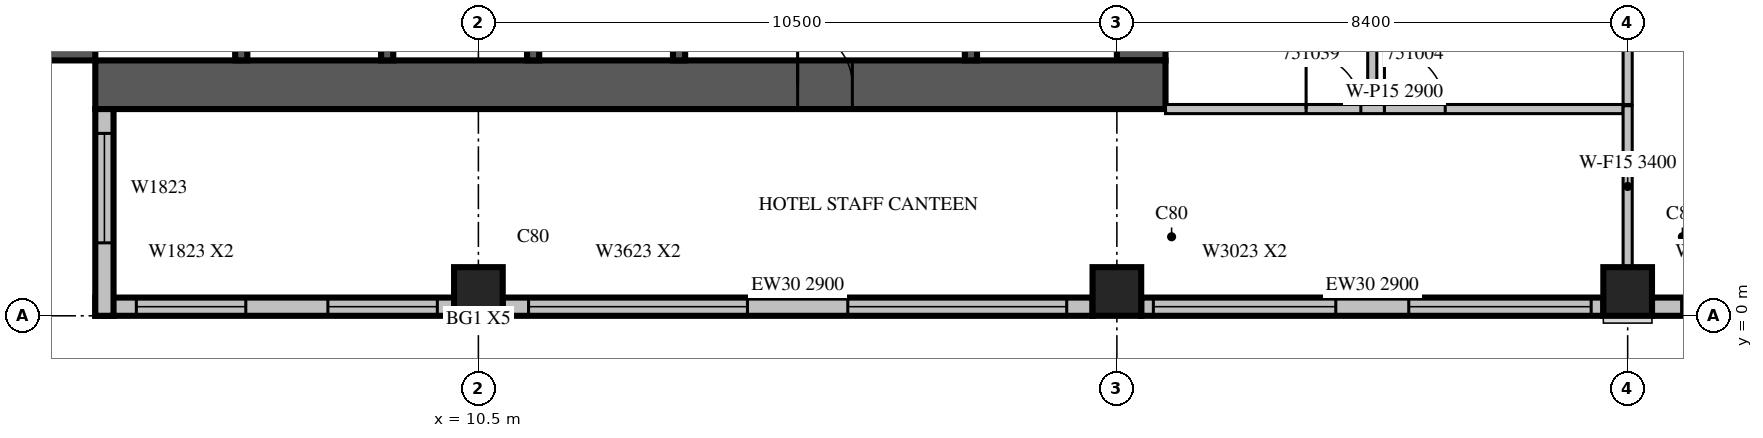
"""IFC4 building model, lengths in metres.
Left out: names, types, materials, properties, quantities, classifications, styles, units other than length and angle.
Written with IfcOpenShell. Run it as: python <this file> out.ifc"""

import sys

from ifc_helpers import new_model, si_unit, direction, frame, frame_2d, origin, origin_2d, place, context, subcontext, project, spatial, rectangle, extrude, source, transform, mapped, element, fill, save


model = new_model("IFC4")
c1 = context("Model", 3, precision=1e-05, world=origin(), true_north=direction((0.0, 1.0)))
c2 = subcontext(c1, "Body", "Model", "MODEL_VIEW")
j1 = project(units=[si_unit("LENGTHUNIT", "METRE"), si_unit("PLANEANGLEUNIT", "RADIAN")], contexts=[c1])
p1 = place(None, origin())
s1 = spatial("IfcSite", under=j1, at=p1, CompositionType="ELEMENT")
p2 = place(p1, origin())
s2 = spatial("IfcBuilding", under=s1, at=p2, CompositionType="ELEMENT")
p3 = place(p2, frame((0.0, 0.0, 227.2)))
s3 = spatial("IfcBuildingStorey", under=s2, at=p3, CompositionType="ELEMENT", Elevation=227.2)
p4 = place(p3, frame((10.5, 0.4, 0.0), z_axis=(0.0, 0.0, 1.0), x_axis=(1.0, 0.0, 0.0)))
e1 = element("IfcColumn", 1, at=p4, inside=s3, PredefinedType="COLUMN", context=c2, shape_type="SweptSolid", body=[
    extrude(rectangle(XDim=0.8, YDim=0.8, at=origin_2d()), origin(), (0.0, 0.0, 1.0), 3.8),
])
m1 = source(origin(), c2, "Body", "SweptSolid", [
    extrude(rectangle(XDim=0.8, YDim=0.8, at=origin_2d()), origin(), (0.0, 0.0, 1.0), 3.8),
])
for number, where, z_axis, x_axis in (
    (2, (21.0, 0.4, 0.0), (0.0, 0.0, 1.0), (1.0, 0.0, 0.0)),
    (3, (29.4, 0.4, 0.0), (0.0, 0.0, 1.0), (1.0, 0.0, 0.0)),
):
    element("IfcColumn", number, at=place(p3, frame(where, z_axis=z_axis, x_axis=x_axis)), inside=s3, PredefinedType="COLUMN", context=c2, shape_type="MappedRepresentation", body=[
        mapped(m1, transform((0.0, 0.0, 0.0), scale=1.0)),
    ])
m2 = source(origin(), c2, "Body", "SweptSolid", [
    extrude(rectangle(XDim=17.6, YDim=0.8, at=frame_2d((8.8, 0.0))), origin(), (0.0, 0.0, 1.0), 3.8),
])
p5 = place(p3, frame((3.8, 4.2, 0.0), z_axis=(0.0, 0.0, 1.0), x_axis=(0.0, 1.0, 0.0)))
e4 = element("IfcWall", 4, at=p5, inside=s3, PredefinedType="SHEAR", context=c2, shape_type="MappedRepresentation", body=[
    mapped(m2, transform((0.0, 0.0, 0.0), scale=1.0)),
])
m3 = source(origin(), c2, "Body", "SweptSolid", [
    extrude(rectangle(XDim=2.2, YDim=2.1, at=frame_2d((1.1, 1.05))), frame((0.0, 0.41, 0.0), z_axis=(0.0, -1.0, 0.0), x_axis=(1.0, 0.0, 0.0)), (0.0, 0.0, 1.0), 0.82),
])
p6 = place(p5, frame((4.2, 0.0, 0.0)))
e5 = element("IfcOpeningElement", 5, at=p6, cuts=e4, PredefinedType="OPENING", context=c2, shape_type="MappedRepresentation", body=[
    mapped(m3, transform((0.0, 0.0, 0.0), scale=1.0)),
])
m4 = source(origin(), c2, "Body", "SweptSolid", [
    extrude(rectangle(XDim=0.9, YDim=2.1, at=frame_2d((0.45, 1.05))), frame((0.0, 0.41, 0.0), z_axis=(0.0, -1.0, 0.0), x_axis=(1.0, 0.0, 0.0)), (0.0, 0.0, 1.0), 0.82),
])
p7 = place(p5, frame((10.95, 0.0, 0.0)))
e6 = element("IfcOpeningElement", 6, at=p7, cuts=e4, PredefinedType="OPENING", context=c2, shape_type="MappedRepresentation", body=[
    mapped(m4, transform((0.0, 0.0, 0.0), scale=1.0)),
])
m5 = source(origin(), c2, "Body", "SweptSolid", [
    extrude(rectangle(XDim=16.8, YDim=0.8, at=frame_2d((8.4, 0.0))), origin(), (0.0, 0.0, 1.0), 3.8),
])
p8 = place(p3, frame((21.4, 4.2, 0.0), z_axis=(0.0, 0.0, 1.0), x_axis=(0.0, 1.0, 0.0)))
e7 = element("IfcWall", 7, at=p8, inside=s3, PredefinedType="SHEAR", context=c2, shape_type="MappedRepresentation", body=[
    mapped(m5, transform((0.0, 0.0, 0.0), scale=1.0)),
])
p9 = place(p8, frame((4.2, 0.0, 0.0)))
e8 = element("IfcOpeningElement", 8, at=p9, cuts=e7, PredefinedType="OPENING", context=c2, shape_type="MappedRepresentation", body=[
    mapped(m3, transform((0.0, 0.0, 0.0), scale=1.0)),
])
m6 = source(origin(), c2, "Body", "SweptSolid", [
    extrude(rectangle(XDim=1.2, YDim=2.1, at=frame_2d((0.6, 1.05))), frame((0.0, 0.41, 0.0), z_axis=(0.0, -1.0, 0.0), x_axis=(1.0, 0.0, 0.0)), (0.0, 0.0, 1.0), 0.82),
])
p10 = place(p8, frame((14.7, 0.0, 0.0)))
e9 = element("IfcOpeningElement", 9, at=p10, cuts=e7, PredefinedType="OPENING", context=c2, shape_type="MappedRepresentation", body=[
    mapped(m6, transform((0.0, 0.0, 0.0), scale=1.0)),
])
p11 = place(p3, frame((4.2, 3.8, 0.0), z_axis=(0.0, 0.0, 1.0), x_axis=(1.0, 0.0, 0.0)))
e10 = element("IfcWall", 10, at=p11, inside=s3, PredefinedType="SHEAR", context=c2, shape_type="MappedRepresentation", body=[
    mapped(m2, transform((0.0, 0.0, 0.0), scale=1.0)),
])
p12 = place(p11, frame((11.55, 0.0, 0.0)))
e11 = element("IfcOpeningElement", 11, at=p12, cuts=e10, PredefinedType="OPENING", context=c2, shape_type="MappedRepresentation", body=[
    mapped(m4, transform((0.0, 0.0, 0.0), scale=1.0)),
])
p13 = place(p3, frame((4.2, 0.15, 0.0), z_axis=(0.0, 0.0, 1.0), x_axis=(1.0, 0.0, 0.0)))
e12 = element("IfcWall", 12, at=p13, inside=s3, PredefinedType="STANDARD", context=c2, shape_type="SweptSolid", body=[
    extrude(rectangle(XDim=5.9, YDim=0.3, at=frame_2d((2.95, 0.0))), origin(), (0.0, 0.0, 1.0), 3.4),
])
m7 = source(origin(), c2, "Body", "SweptSolid", [
    extrude(rectangle(XDim=1.8, YDim=2.3, at=frame_2d((0.9, 1.15))), frame((0.0, 0.16, 0.0), z_axis=(0.0, -1.0, 0.0), x_axis=(1.0, 0.0, 0.0)), (0.0, 0.0, 1.0), 0.32),
])
p14 = place(p13, frame((0.675, 0.0, 0.6)))
e13 = element("IfcOpeningElement", 13, at=p14, cuts=e12, PredefinedType="OPENING", context=c2, shape_type="MappedRepresentation", body=[
    mapped(m7, transform((0.0, 0.0, 0.0), scale=1.0)),
])
p15 = place(p13, frame((3.825, 0.0, 0.6)))
e14 = element("IfcOpeningElement", 14, at=p15, cuts=e12, PredefinedType="OPENING", context=c2, shape_type="MappedRepresentation", body=[
    mapped(m7, transform((0.0, 0.0, 0.0), scale=1.0)),
])
p16 = place(p3, frame((10.9, 0.15, 0.0), z_axis=(0.0, 0.0, 1.0), x_axis=(1.0, 0.0, 0.0)))
e15 = element("IfcWall", 15, at=p16, inside=s3, PredefinedType="STANDARD", context=c2, shape_type="SweptSolid", body=[
    extrude(rectangle(XDim=9.7, YDim=0.3, at=frame_2d((4.85, 0.0))), origin(), (0.0, 0.0, 1.0), 2.9),
])
m8 = source(origin(), c2, "Body", "SweptSolid", [
    extrude(rectangle(XDim=3.6, YDim=2.3, at=frame_2d((1.8, 1.15))), frame((0.0, 0.16, 0.0), z_axis=(0.0, -1.0, 0.0), x_axis=(1.0, 0.0, 0.0)), (0.0, 0.0, 1.0), 0.32),
])
p17 = place(p16, frame((0.425, 0.0, 0.6)))
e16 = element("IfcOpeningElement", 16, at=p17, cuts=e15, PredefinedType="OPENING", context=c2, shape_type="MappedRepresentation", body=[
    mapped(m8, transform((0.0, 0.0, 0.0), scale=1.0)),
])
p18 = place(p16, frame((5.675, 0.0, 0.6)))
e17 = element("IfcOpeningElement", 17, at=p18, cuts=e15, PredefinedType="OPENING", context=c2, shape_type="MappedRepresentation", body=[
    mapped(m8, transform((0.0, 0.0, 0.0), scale=1.0)),
])
p19 = place(p3, frame((21.4, 0.15, 0.0), z_axis=(0.0, 0.0, 1.0), x_axis=(1.0, 0.0, 0.0)))
e18 = element("IfcWall", 18, at=p19, inside=s3, PredefinedType="STANDARD", context=c2, shape_type="SweptSolid", body=[
    extrude(rectangle(XDim=7.6, YDim=0.3, at=frame_2d((3.8, 0.0))), origin(), (0.0, 0.0, 1.0), 2.9),
])
m9 = source(origin(), c2, "Body", "SweptSolid", [
    extrude(rectangle(XDim=3.0, YDim=2.3, at=frame_2d((1.5, 1.15))), frame((0.0, 0.16, 0.0), z_axis=(0.0, -1.0, 0.0), x_axis=(1.0, 0.0, 0.0)), (0.0, 0.0, 1.0), 0.32),
])
p20 = place(p19, frame((0.2, 0.0, 0.6)))
e19 = element("IfcOpeningElement", 19, at=p20, cuts=e18, PredefinedType="OPENING", context=c2, shape_type="MappedRepresentation", body=[
    mapped(m9, transform((0.0, 0.0, 0.0), scale=1.0)),
])
p21 = place(p19, frame((4.4, 0.0, 0.6)))
e20 = element("IfcOpeningElement", 20, at=p21, cuts=e18, PredefinedType="OPENING", context=c2, shape_type="MappedRepresentation", body=[
    mapped(m9, transform((0.0, 0.0, 0.0), scale=1.0)),
])
p22 = place(p3, frame((29.8, 0.15, 0.0), z_axis=(0.0, 0.0, 1.0), x_axis=(1.0, 0.0, 0.0)))
e21 = element("IfcWall", 21, at=p22, inside=s3, PredefinedType="STANDARD", context=c2, shape_type="SweptSolid", body=[
    extrude(rectangle(XDim=7.6, YDim=0.3, at=frame_2d((3.8, 0.0))), origin(), (0.0, 0.0, 1.0), 3.4),
])
m10 = source(origin(), c2, "Body", "SweptSolid", [
    extrude(rectangle(XDim=1.2, YDim=2.3, at=frame_2d((0.6, 1.15))), frame((0.0, 0.16, 0.0), z_axis=(0.0, -1.0, 0.0), x_axis=(1.0, 0.0, 0.0)), (0.0, 0.0, 1.0), 0.32),
])
p23 = place(p22, frame((0.487, 0.0, 0.6)))
e22 = element("IfcOpeningElement", 22, at=p23, cuts=e21, PredefinedType="OPENING", context=c2, shape_type="MappedRepresentation", body=[
    mapped(m10, transform((0.0, 0.0, 0.0), scale=1.0)),
])
p24 = place(p22, frame((6.013, 0.0, 0.6)))
e23 = element("IfcOpeningElement", 23, at=p24, cuts=e21, PredefinedType="OPENING", context=c2, shape_type="MappedRepresentation", body=[
    mapped(m10, transform((0.0, 0.0, 0.0), scale=1.0)),
])
m11 = source(origin(), c2, "Body", "SweptSolid", [
    extrude(rectangle(XDim=3.4, YDim=0.3, at=frame_2d((1.7, 0.0))), origin(), (0.0, 0.0, 1.0), 3.4),
])
p25 = place(p3, frame((4.35, 3.4, 0.0), z_axis=(0.0, 0.0, 1.0), x_axis=(0.0, -1.0, 0.0)))
e24 = element("IfcWall", 24, at=p25, inside=s3, PredefinedType="STANDARD", context=c2, shape_type="MappedRepresentation", body=[
    mapped(m11, transform((0.0, 0.0, 0.0), scale=1.0)),
])
p26 = place(p25, frame((0.4, 0.0, 0.6)))
e25 = element("IfcOpeningElement", 25, at=p26, cuts=e24, PredefinedType="OPENING", context=c2, shape_type="MappedRepresentation", body=[
    mapped(m7, transform((0.0, 0.0, 0.0), scale=1.0)),
])
m12 = source(origin(), c2, "Body", "SweptSolid", [
    extrude(rectangle(XDim=3.1, YDim=0.2, at=frame_2d((1.55, 0.0))), origin(), (0.0, 0.0, 1.0), 3.8),
])
for number, where, z_axis, x_axis in (
    (26, (6.6, 4.2, 0.0), (0.0, 0.0, 1.0), (0.0, 1.0, 0.0)),
    (27, (9.0, 4.2, 0.0), (0.0, 0.0, 1.0), (0.0, 1.0, 0.0)),
    (28, (11.4, 4.2, 0.0), (0.0, 0.0, 1.0), (0.0, 1.0, 0.0)),
):
    element("IfcWall", number, at=place(p3, frame(where, z_axis=z_axis, x_axis=x_axis)), inside=s3, PredefinedType="SOLIDWALL", context=c2, shape_type="MappedRepresentation", body=[
        mapped(m12, transform((0.0, 0.0, 0.0), scale=1.0)),
    ])
m13 = source(origin(), c2, "Body", "SweptSolid", [
    extrude(rectangle(XDim=3.1, YDim=0.2, at=frame_2d((1.55, 0.0))), origin(), (0.0, 0.0, 1.0), 3.4),
])
for number, where, z_axis, x_axis in (
    (29, (13.8, 4.2, 0.0), (0.0, 0.0, 1.0), (0.0, 1.0, 0.0)),
    (30, (18.6, 4.2, 0.0), (0.0, 0.0, 1.0), (0.0, 1.0, 0.0)),
):
    element("IfcWall", number, at=place(p3, frame(where, z_axis=z_axis, x_axis=x_axis)), inside=s3, PredefinedType="SOLIDWALL", context=c2, shape_type="MappedRepresentation", body=[
        mapped(m13, transform((0.0, 0.0, 0.0), scale=1.0)),
    ])
m14 = source(origin(), c2, "Body", "SweptSolid", [
    extrude(rectangle(XDim=11.525, YDim=0.15, at=frame_2d((5.763, 0.0))), origin(), (0.0, 0.0, 1.0), 2.4),
])
p27 = place(p3, frame((25.2, 15.0, 0.0), z_axis=(0.0, 0.0, 1.0), x_axis=(0.0, -1.0, 0.0)))
e31 = element("IfcWall", 31, at=p27, inside=s3, PredefinedType="PARTITIONING", context=c2, shape_type="MappedRepresentation", body=[
    mapped(m14, transform((0.0, 0.0, 0.0), scale=1.0)),
])
m15 = source(origin(), c2, "Body", "SweptSolid", [
    extrude(rectangle(XDim=0.9, YDim=2.1, at=frame_2d((0.45, 1.05))), frame((0.0, 0.085, 0.0), z_axis=(0.0, -1.0, 0.0), x_axis=(1.0, 0.0, 0.0)), (0.0, 0.0, 1.0), 0.17),
])
p28 = place(p27, frame((7.562, 0.0, 0.0)))
e32 = element("IfcOpeningElement", 32, at=p28, cuts=e31, PredefinedType="OPENING", context=c2, shape_type="MappedRepresentation", body=[
    mapped(m15, transform((0.0, 0.0, 0.0), scale=1.0)),
])
p29 = place(p27, frame((0.925, 0.0, 0.0)))
e33 = element("IfcOpeningElement", 33, at=p29, cuts=e31, PredefinedType="OPENING", context=c2, shape_type="MappedRepresentation", body=[
    mapped(m15, transform((0.0, 0.0, 0.0), scale=1.0)),
])
p30 = place(p3, frame((29.4, 3.475, 0.0), z_axis=(0.0, 0.0, 1.0), x_axis=(0.0, 1.0, 0.0)))
e34 = element("IfcWall", 34, at=p30, inside=s3, PredefinedType="PARTITIONING", context=c2, shape_type="SweptSolid", body=[
    extrude(rectangle(XDim=6.626, YDim=0.15, at=frame_2d((3.313, 0.0))), origin(), (0.0, 0.0, 1.0), 3.4),
])
m16 = source(origin(), c2, "Body", "SweptSolid", [
    extrude(rectangle(XDim=7.525, YDim=0.15, at=frame_2d((3.763, 0.0))), origin(), (0.0, 0.0, 1.0), 2.9),
])
p31 = place(p3, frame((21.8, 3.4, 0.0), z_axis=(0.0, 0.0, 1.0), x_axis=(1.0, 0.0, 0.0)))
e35 = element("IfcWall", 35, at=p31, inside=s3, PredefinedType="PARTITIONING", context=c2, shape_type="MappedRepresentation", body=[
    mapped(m16, transform((0.0, 0.0, 0.0), scale=1.0)),
])
m17 = source(origin(), c2, "Body", "SweptSolid", [
    extrude(rectangle(XDim=1.0, YDim=2.1, at=frame_2d((0.5, 1.05))), frame((0.0, 0.085, 0.0), z_axis=(0.0, -1.0, 0.0), x_axis=(1.0, 0.0, 0.0)), (0.0, 0.0, 1.0), 0.17),
])
p32 = place(p31, frame((3.6, 0.0, 0.0)))
e36 = element("IfcOpeningElement", 36, at=p32, cuts=e35, PredefinedType="OPENING", context=c2, shape_type="MappedRepresentation", body=[
    mapped(m17, transform((0.0, 0.0, 0.0), scale=1.0)),
])
p33 = place(p31, frame((2.312, 0.0, 0.0)))
e37 = element("IfcOpeningElement", 37, at=p33, cuts=e35, PredefinedType="OPENING", context=c2, shape_type="MappedRepresentation", body=[
    mapped(m15, transform((0.0, 0.0, 0.0), scale=1.0)),
])
p34 = place(p3, frame((29.4, 0.799, 0.0), z_axis=(0.0, 0.0, 1.0), x_axis=(0.0, 1.0, 0.0)))
e38 = element("IfcWall", 38, at=p34, inside=s3, PredefinedType="PARTITIONING", context=c2, shape_type="SweptSolid", body=[
    extrude(rectangle(XDim=2.656, YDim=0.15, at=frame_2d((1.328, 0.0))), origin(), (0.0, 0.0, 1.0), 3.4),
])
m18 = source(origin(), c2, "Body", "SweptSolid", [
    extrude(rectangle(XDim=1.8, YDim=2.3, at=frame_2d((0.9, 1.15))), frame((0.0, 0.03, 0.0), z_axis=(0.0, -1.0, 0.0), x_axis=(1.0, 0.0, 0.0)), (0.0, 0.0, 1.0), 0.06),
])
p35 = place(p14, origin())
e39 = element("IfcWindow", 39, at=p35, inside=s3, PartitioningType="SINGLE_PANEL", PredefinedType="WINDOW", context=c2, shape_type="MappedRepresentation", body=[
    mapped(m18, transform((0.0, 0.0, 0.0), scale=1.0)),
])
fill(e13, e39)
p36 = place(p15, origin())
e40 = element("IfcWindow", 40, at=p36, inside=s3, PartitioningType="SINGLE_PANEL", PredefinedType="WINDOW", context=c2, shape_type="MappedRepresentation", body=[
    mapped(m18, transform((0.0, 0.0, 0.0), scale=1.0)),
])
fill(e14, e40)
m19 = source(origin(), c2, "Body", "SweptSolid", [
    extrude(rectangle(XDim=3.6, YDim=2.3, at=frame_2d((1.8, 1.15))), frame((0.0, 0.03, 0.0), z_axis=(0.0, -1.0, 0.0), x_axis=(1.0, 0.0, 0.0)), (0.0, 0.0, 1.0), 0.06),
])
p37 = place(p17, origin())
e41 = element("IfcWindow", 41, at=p37, inside=s3, PartitioningType="SINGLE_PANEL", PredefinedType="WINDOW", context=c2, shape_type="MappedRepresentation", body=[
    mapped(m19, transform((0.0, 0.0, 0.0), scale=1.0)),
])
fill(e16, e41)
p38 = place(p18, origin())
e42 = element("IfcWindow", 42, at=p38, inside=s3, PartitioningType="SINGLE_PANEL", PredefinedType="WINDOW", context=c2, shape_type="MappedRepresentation", body=[
    mapped(m19, transform((0.0, 0.0, 0.0), scale=1.0)),
])
fill(e17, e42)
m20 = source(origin(), c2, "Body", "SweptSolid", [
    extrude(rectangle(XDim=3.0, YDim=2.3, at=frame_2d((1.5, 1.15))), frame((0.0, 0.03, 0.0), z_axis=(0.0, -1.0, 0.0), x_axis=(1.0, 0.0, 0.0)), (0.0, 0.0, 1.0), 0.06),
])
p39 = place(p20, origin())
e43 = element("IfcWindow", 43, at=p39, inside=s3, PartitioningType="SINGLE_PANEL", PredefinedType="WINDOW", context=c2, shape_type="MappedRepresentation", body=[
    mapped(m20, transform((0.0, 0.0, 0.0), scale=1.0)),
])
fill(e19, e43)
p40 = place(p21, origin())
e44 = element("IfcWindow", 44, at=p40, inside=s3, PartitioningType="SINGLE_PANEL", PredefinedType="WINDOW", context=c2, shape_type="MappedRepresentation", body=[
    mapped(m20, transform((0.0, 0.0, 0.0), scale=1.0)),
])
fill(e20, e44)
m21 = source(origin(), c2, "Body", "SweptSolid", [
    extrude(rectangle(XDim=1.2, YDim=2.3, at=frame_2d((0.6, 1.15))), frame((0.0, 0.03, 0.0), z_axis=(0.0, -1.0, 0.0), x_axis=(1.0, 0.0, 0.0)), (0.0, 0.0, 1.0), 0.06),
])
p41 = place(p23, origin())
e45 = element("IfcWindow", 45, at=p41, inside=s3, PartitioningType="SINGLE_PANEL", PredefinedType="WINDOW", context=c2, shape_type="MappedRepresentation", body=[
    mapped(m21, transform((0.0, 0.0, 0.0), scale=1.0)),
])
fill(e22, e45)
p42 = place(p26, origin())
e46 = element("IfcWindow", 46, at=p42, inside=s3, PartitioningType="SINGLE_PANEL", PredefinedType="WINDOW", context=c2, shape_type="MappedRepresentation", body=[
    mapped(m18, transform((0.0, 0.0, 0.0), scale=1.0)),
])
fill(e25, e46)
m22 = source(origin(), c2, "Body", "SweptSolid", [
    extrude(rectangle(XDim=0.9, YDim=2.1, at=frame_2d((0.45, 1.05))), frame((0.0, 0.025, 0.0), z_axis=(0.0, -1.0, 0.0), x_axis=(1.0, 0.0, 0.0)), (0.0, 0.0, 1.0), 0.05),
])
p43 = place(p12, origin())
e47 = element("IfcDoor", 47, at=p43, inside=s3, OperationType="SINGLE_SWING_LEFT", PredefinedType="DOOR", context=c2, shape_type="MappedRepresentation", body=[
    mapped(m22, transform((0.0, 0.0, 0.0), scale=1.0)),
])
fill(e11, e47)
m23 = source(origin(), c2, "Body", "SweptSolid", [
    extrude(rectangle(XDim=1.0, YDim=2.1, at=frame_2d((0.5, 1.05))), frame((0.0, 0.025, 0.0), z_axis=(0.0, -1.0, 0.0), x_axis=(1.0, 0.0, 0.0)), (0.0, 0.0, 1.0), 0.05),
])
p44 = place(p32, origin())
e48 = element("IfcDoor", 48, at=p44, inside=s3, OperationType="SINGLE_SWING_LEFT", PredefinedType="DOOR", context=c2, shape_type="MappedRepresentation", body=[
    mapped(m23, transform((0.0, 0.0, 0.0), scale=1.0)),
])
fill(e36, e48)
p45 = place(p33, origin())
e49 = element("IfcDoor", 49, at=p45, inside=s3, OperationType="SINGLE_SWING_LEFT", PredefinedType="DOOR", context=c2, shape_type="MappedRepresentation", body=[
    mapped(m22, transform((0.0, 0.0, 0.0), scale=1.0)),
])
fill(e37, e49)
save(model, sys.argv[1])
